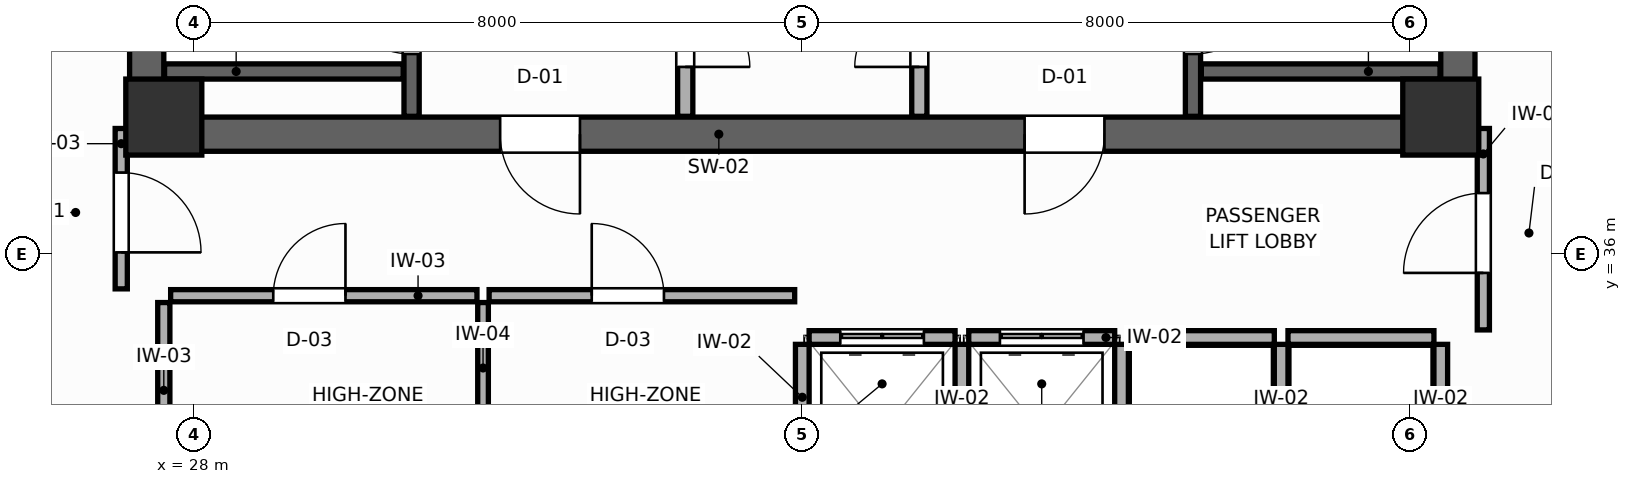
"""IFC4 building model, lengths in metres.
Left out: names, types, materials, properties, quantities, classifications, styles, units other than length and angle.
Written with IfcOpenShell. Run it as: python <this file> out.ifc"""

import sys

from ifc_helpers import new_model, si_unit, direction, frame, frame_2d, origin, origin_2d, place, context, subcontext, project, spatial, rectangle, extrude, source, transform, mapped, element, fill, save


model = new_model("IFC4")
c1 = context("Model", 3, precision=1e-05, world=origin(), true_north=direction((0.0, 1.0)))
c2 = subcontext(c1, "Body", "Model", "MODEL_VIEW")
j1 = project(units=[si_unit("LENGTHUNIT", "METRE"), si_unit("PLANEANGLEUNIT", "RADIAN")], contexts=[c1])
p1 = place(None, origin())
s1 = spatial("IfcSite", under=j1, at=p1, CompositionType="ELEMENT")
p2 = place(p1, origin())
s2 = spatial("IfcBuilding", under=s1, at=p2, CompositionType="ELEMENT")
p3 = place(p2, frame((0.0, 0.0, 186.6)))
s3 = spatial("IfcBuildingStorey", under=s2, at=p3, CompositionType="ELEMENT", Elevation=186.6)
p4 = place(p3, frame((27.15, 37.575, 0.0), z_axis=(0.0, 0.0, 1.0), x_axis=(1.0, 0.0, 0.0)))
e1 = element("IfcWall", 1, at=p4, inside=s3, PredefinedType="SHEAR", context=c2, shape_type="SweptSolid", body=[
    extrude(rectangle(XDim=17.7, YDim=0.45, at=frame_2d((8.85, 0.0))), origin(), (0.0, 0.0, 1.0), 3.6),
])
p5 = place(p4, frame((4.875, 0.0, 0.0)))
e2 = element("IfcOpeningElement", 2, at=p5, cuts=e1, PredefinedType="OPENING", context=c2, shape_type="SweptSolid", body=[
    extrude(rectangle(XDim=1.05, YDim=2.1, at=frame_2d((0.525, 1.05))), frame((0.0, 0.235, 0.0), z_axis=(0.0, -1.0, 0.0), x_axis=(1.0, 0.0, 0.0)), (0.0, 0.0, 1.0), 0.47),
])
p6 = place(p4, frame((11.775, 0.0, 0.0)))
e3 = element("IfcOpeningElement", 3, at=p6, cuts=e1, PredefinedType="OPENING", context=c2, shape_type="SweptSolid", body=[
    extrude(rectangle(XDim=1.05, YDim=2.1, at=frame_2d((0.525, 1.05))), frame((0.0, 0.235, 0.0), z_axis=(0.0, -1.0, 0.0), x_axis=(1.0, 0.0, 0.0)), (0.0, 0.0, 1.0), 0.47),
])
for number, where, z_axis, x_axis in (
    (4, (27.375, 37.8, 0.0), (0.0, 0.0, 1.0), (0.0, 1.0, 0.0)),
    (5, (44.625, 37.8, 0.0), (0.0, 0.0, 1.0), (0.0, 1.0, 0.0)),
):
    element("IfcWall", number, at=place(p3, frame(where, z_axis=z_axis, x_axis=x_axis)), inside=s3, PredefinedType="SHEAR", context=c2, shape_type="SweptSolid", body=[
        extrude(rectangle(XDim=9.0, YDim=0.45, at=frame_2d((4.5, 0.0))), origin(), (0.0, 0.0, 1.0), 3.6),
    ])
m1 = source(origin(), c2, "Body", "SweptSolid", [
    extrude(rectangle(XDim=1.0, YDim=1.0, at=origin_2d()), origin(), (0.0, 0.0, 1.0), 3.6),
])
for number, where, z_axis, x_axis in (
    (6, (27.6, 37.8, 0.0), (0.0, 0.0, 1.0), (1.0, 0.0, 0.0)),
    (7, (44.4, 37.8, 0.0), (0.0, 0.0, 1.0), (1.0, 0.0, 0.0)),
):
    element("IfcColumn", number, at=place(p3, frame(where, z_axis=z_axis, x_axis=x_axis)), inside=s3, PredefinedType="COLUMN", context=c2, shape_type="MappedRepresentation", body=[
        mapped(m1, transform((0.0, 0.0, 0.0), scale=1.0)),
    ])
p7 = place(p3, frame((30.86, 37.81, 0.0), z_axis=(0.0, 0.0, 1.0), x_axis=(0.0, 1.0, 0.0)))
e8 = element("IfcWall", 8, at=p7, inside=s3, PredefinedType="SHEAR", context=c2, shape_type="SweptSolid", body=[
    extrude(rectangle(XDim=8.98, YDim=0.2, at=frame_2d((4.49, 0.0))), origin(), (0.0, 0.0, 1.0), 3.6),
])
p8 = place(p7, frame((0.82, 0.0, 0.0)))
e9 = element("IfcOpeningElement", 9, at=p8, cuts=e8, PredefinedType="OPENING", context=c2, shape_type="SweptSolid", body=[
    extrude(rectangle(XDim=1.05, YDim=2.1, at=frame_2d((0.525, 1.05))), frame((0.0, 0.11, 0.0), z_axis=(0.0, -1.0, 0.0), x_axis=(1.0, 0.0, 0.0)), (0.0, 0.0, 1.0), 0.22),
])
p9 = place(p3, frame((27.61, 38.4, 0.0), z_axis=(0.0, 0.0, 1.0), x_axis=(1.0, 0.0, 0.0)))
e10 = element("IfcWall", 10, at=p9, inside=s3, PredefinedType="SHEAR", context=c2, shape_type="SweptSolid", body=[
    extrude(rectangle(XDim=3.14, YDim=0.2, at=frame_2d((1.57, 0.0))), origin(), (0.0, 0.0, 1.0), 3.6),
])
p10 = place(p3, frame((41.14, 37.81, 0.0), z_axis=(0.0, 0.0, 1.0), x_axis=(0.0, 1.0, 0.0)))
e11 = element("IfcWall", 11, at=p10, inside=s3, PredefinedType="SHEAR", context=c2, shape_type="SweptSolid", body=[
    extrude(rectangle(XDim=8.98, YDim=0.2, at=frame_2d((4.49, 0.0))), origin(), (0.0, 0.0, 1.0), 3.6),
])
p11 = place(p10, frame((0.82, 0.0, 0.0)))
e12 = element("IfcOpeningElement", 12, at=p11, cuts=e11, PredefinedType="OPENING", context=c2, shape_type="SweptSolid", body=[
    extrude(rectangle(XDim=1.05, YDim=2.1, at=frame_2d((0.525, 1.05))), frame((0.0, 0.11, 0.0), z_axis=(0.0, -1.0, 0.0), x_axis=(1.0, 0.0, 0.0)), (0.0, 0.0, 1.0), 0.22),
])
p12 = place(p3, frame((41.25, 38.4, 0.0), z_axis=(0.0, 0.0, 1.0), x_axis=(1.0, 0.0, 0.0)))
e13 = element("IfcWall", 13, at=p12, inside=s3, PredefinedType="SHEAR", context=c2, shape_type="SweptSolid", body=[
    extrude(rectangle(XDim=3.14, YDim=0.2, at=frame_2d((1.57, 0.0))), origin(), (0.0, 0.0, 1.0), 3.6),
])
p13 = place(p3, frame((34.46, 37.81, 0.0), z_axis=(0.0, 0.0, 1.0), x_axis=(0.0, 1.0, 0.0)))
e14 = element("IfcWall", 14, at=p13, inside=s3, PredefinedType="PARTITIONING", context=c2, shape_type="SweptSolid", body=[
    extrude(rectangle(XDim=8.98, YDim=0.2, at=frame_2d((4.49, 0.0))), origin(), (0.0, 0.0, 1.0), 3.4),
])
p14 = place(p13, frame((0.65, 0.0, 0.0)))
e15 = element("IfcOpeningElement", 15, at=p14, cuts=e14, PredefinedType="OPENING", context=c2, shape_type="SweptSolid", body=[
    extrude(rectangle(XDim=0.85, YDim=2.05, at=frame_2d((0.425, 1.025))), frame((0.0, 0.11, 0.0), z_axis=(0.0, -1.0, 0.0), x_axis=(1.0, 0.0, 0.0)), (0.0, 0.0, 1.0), 0.22),
])
p15 = place(p3, frame((37.54, 37.81, 0.0), z_axis=(0.0, 0.0, 1.0), x_axis=(0.0, 1.0, 0.0)))
e16 = element("IfcWall", 16, at=p15, inside=s3, PredefinedType="PARTITIONING", context=c2, shape_type="SweptSolid", body=[
    extrude(rectangle(XDim=8.98, YDim=0.2, at=frame_2d((4.49, 0.0))), origin(), (0.0, 0.0, 1.0), 3.4),
])
p16 = place(p15, frame((0.65, 0.0, 0.0)))
e17 = element("IfcOpeningElement", 17, at=p16, cuts=e16, PredefinedType="OPENING", context=c2, shape_type="SweptSolid", body=[
    extrude(rectangle(XDim=0.85, YDim=2.05, at=frame_2d((0.425, 1.025))), frame((0.0, 0.11, 0.0), z_axis=(0.0, -1.0, 0.0), x_axis=(1.0, 0.0, 0.0)), (0.0, 0.0, 1.0), 0.22),
])
p17 = place(p3, frame((36.09, 34.9, 0.0), z_axis=(0.0, 0.0, 1.0), x_axis=(1.0, 0.0, 0.0)))
e18 = element("IfcWall", 18, at=p17, inside=s3, PredefinedType="PARTITIONING", context=c2, shape_type="SweptSolid", body=[
    extrude(rectangle(XDim=1.92, YDim=0.18, at=frame_2d((0.96, 0.0))), origin(), (0.0, 0.0, 1.0), 3.4),
])
p18 = place(p17, frame((0.41, 0.0, 0.0)))
e19 = element("IfcOpeningElement", 19, at=p18, cuts=e18, PredefinedType="OPENING", context=c2, shape_type="SweptSolid", body=[
    extrude(rectangle(XDim=1.1, YDim=2.1, at=frame_2d((0.55, 1.05))), frame((0.0, 0.1, 0.0), z_axis=(0.0, -1.0, 0.0), x_axis=(1.0, 0.0, 0.0)), (0.0, 0.0, 1.0), 0.2),
])
p19 = place(p3, frame((36.0, 32.49, 0.0), z_axis=(0.0, 0.0, 1.0), x_axis=(0.0, 1.0, 0.0)))
e20 = element("IfcWall", 20, at=p19, inside=s3, PredefinedType="PARTITIONING", context=c2, shape_type="SweptSolid", body=[
    extrude(rectangle(XDim=2.32, YDim=0.18, at=frame_2d((1.16, 0.0))), origin(), (0.0, 0.0, 1.0), 3.4),
])
p20 = place(p3, frame((38.19, 34.9, 0.0), z_axis=(0.0, 0.0, 1.0), x_axis=(1.0, 0.0, 0.0)))
e21 = element("IfcWall", 21, at=p20, inside=s3, PredefinedType="PARTITIONING", context=c2, shape_type="SweptSolid", body=[
    extrude(rectangle(XDim=1.92, YDim=0.18, at=frame_2d((0.96, 0.0))), origin(), (0.0, 0.0, 1.0), 3.4),
])
p21 = place(p20, frame((0.41, 0.0, 0.0)))
e22 = element("IfcOpeningElement", 22, at=p21, cuts=e21, PredefinedType="OPENING", context=c2, shape_type="SweptSolid", body=[
    extrude(rectangle(XDim=1.1, YDim=2.1, at=frame_2d((0.55, 1.05))), frame((0.0, 0.1, 0.0), z_axis=(0.0, -1.0, 0.0), x_axis=(1.0, 0.0, 0.0)), (0.0, 0.0, 1.0), 0.2),
])
p22 = place(p3, frame((38.1, 32.49, 0.0), z_axis=(0.0, 0.0, 1.0), x_axis=(0.0, 1.0, 0.0)))
e23 = element("IfcWall", 23, at=p22, inside=s3, PredefinedType="PARTITIONING", context=c2, shape_type="SweptSolid", body=[
    extrude(rectangle(XDim=2.32, YDim=0.18, at=frame_2d((1.16, 0.0))), origin(), (0.0, 0.0, 1.0), 3.4),
])
p23 = place(p3, frame((40.29, 34.9, 0.0), z_axis=(0.0, 0.0, 1.0), x_axis=(1.0, 0.0, 0.0)))
e24 = element("IfcWall", 24, at=p23, inside=s3, PredefinedType="PARTITIONING", context=c2, shape_type="SweptSolid", body=[
    extrude(rectangle(XDim=1.92, YDim=0.18, at=frame_2d((0.96, 0.0))), origin(), (0.0, 0.0, 1.0), 3.4),
])
p24 = place(p3, frame((40.2, 32.49, 0.0), z_axis=(0.0, 0.0, 1.0), x_axis=(0.0, 1.0, 0.0)))
e25 = element("IfcWall", 25, at=p24, inside=s3, PredefinedType="PARTITIONING", context=c2, shape_type="SweptSolid", body=[
    extrude(rectangle(XDim=2.32, YDim=0.18, at=frame_2d((1.16, 0.0))), origin(), (0.0, 0.0, 1.0), 3.4),
])
p25 = place(p3, frame((42.39, 34.9, 0.0), z_axis=(0.0, 0.0, 1.0), x_axis=(1.0, 0.0, 0.0)))
e26 = element("IfcWall", 26, at=p25, inside=s3, PredefinedType="PARTITIONING", context=c2, shape_type="SweptSolid", body=[
    extrude(rectangle(XDim=1.92, YDim=0.18, at=frame_2d((0.96, 0.0))), origin(), (0.0, 0.0, 1.0), 3.4),
])
for number, where, z_axis, x_axis in (
    (27, (42.3, 32.49, 0.0), (0.0, 0.0, 1.0), (0.0, 1.0, 0.0)),
    (28, (44.4, 32.49, 0.0), (0.0, 0.0, 1.0), (0.0, 1.0, 0.0)),
):
    element("IfcWall", number, at=place(p3, frame(where, z_axis=z_axis, x_axis=x_axis)), inside=s3, PredefinedType="PARTITIONING", context=c2, shape_type="SweptSolid", body=[
        extrude(rectangle(XDim=2.32, YDim=0.18, at=frame_2d((1.16, 0.0))), origin(), (0.0, 0.0, 1.0), 3.4),
    ])
p26 = place(p3, frame((27.6, 33.05, 0.0), z_axis=(0.0, 0.0, 1.0), x_axis=(0.0, 1.0, 0.0)))
e29 = element("IfcWall", 29, at=p26, inside=s3, PredefinedType="PARTITIONING", context=c2, shape_type="SweptSolid", body=[
    extrude(rectangle(XDim=2.31, YDim=0.16, at=frame_2d((1.155, 0.0))), origin(), (0.0, 0.0, 1.0), 3.4),
])
p27 = place(p3, frame((31.8, 32.49, 0.0), z_axis=(0.0, 0.0, 1.0), x_axis=(0.0, 1.0, 0.0)))
e30 = element("IfcWall", 30, at=p27, inside=s3, PredefinedType="PARTITIONING", context=c2, shape_type="SweptSolid", body=[
    extrude(rectangle(XDim=2.87, YDim=0.14, at=frame_2d((1.435, 0.0))), origin(), (0.0, 0.0, 1.0), 3.4),
])
p28 = place(p3, frame((27.69, 35.45, 0.0), z_axis=(0.0, 0.0, 1.0), x_axis=(1.0, 0.0, 0.0)))
e31 = element("IfcWall", 31, at=p28, inside=s3, PredefinedType="PARTITIONING", context=c2, shape_type="SweptSolid", body=[
    extrude(rectangle(XDim=4.03, YDim=0.16, at=frame_2d((2.015, 0.0))), origin(), (0.0, 0.0, 1.0), 3.4),
])
p29 = place(p28, frame((1.35, 0.0, 0.0)))
e32 = element("IfcOpeningElement", 32, at=p29, cuts=e31, PredefinedType="OPENING", context=c2, shape_type="SweptSolid", body=[
    extrude(rectangle(XDim=0.95, YDim=2.05, at=frame_2d((0.475, 1.025))), frame((0.0, 0.09, 0.0), z_axis=(0.0, -1.0, 0.0), x_axis=(1.0, 0.0, 0.0)), (0.0, 0.0, 1.0), 0.18),
])
p30 = place(p3, frame((31.88, 35.45, 0.0), z_axis=(0.0, 0.0, 1.0), x_axis=(1.0, 0.0, 0.0)))
e33 = element("IfcWall", 33, at=p30, inside=s3, PredefinedType="PARTITIONING", context=c2, shape_type="SweptSolid", body=[
    extrude(rectangle(XDim=4.02, YDim=0.16, at=frame_2d((2.01, 0.0))), origin(), (0.0, 0.0, 1.0), 3.4),
])
p31 = place(p30, frame((1.35, 0.0, 0.0)))
e34 = element("IfcOpeningElement", 34, at=p31, cuts=e33, PredefinedType="OPENING", context=c2, shape_type="SweptSolid", body=[
    extrude(rectangle(XDim=0.95, YDim=2.05, at=frame_2d((0.475, 1.025))), frame((0.0, 0.09, 0.0), z_axis=(0.0, -1.0, 0.0), x_axis=(1.0, 0.0, 0.0)), (0.0, 0.0, 1.0), 0.18),
])
p32 = place(p3, frame((27.04, 35.54, 0.0), z_axis=(0.0, 0.0, 1.0), x_axis=(0.0, 1.0, 0.0)))
e35 = element("IfcWall", 35, at=p32, inside=s3, PredefinedType="PARTITIONING", context=c2, shape_type="SweptSolid", body=[
    extrude(rectangle(XDim=2.11, YDim=0.16, at=frame_2d((1.055, 0.0))), origin(), (0.0, 0.0, 1.0), 3.4),
])
p33 = place(p32, frame((0.48, 0.0, 0.0)))
e36 = element("IfcOpeningElement", 36, at=p33, cuts=e35, PredefinedType="OPENING", context=c2, shape_type="SweptSolid", body=[
    extrude(rectangle(XDim=1.05, YDim=2.1, at=frame_2d((0.525, 1.05))), frame((0.0, 0.09, 0.0), z_axis=(0.0, -1.0, 0.0), x_axis=(1.0, 0.0, 0.0)), (0.0, 0.0, 1.0), 0.18),
])
p34 = place(p3, frame((44.96, 35.0, 0.0), z_axis=(0.0, 0.0, 1.0), x_axis=(0.0, 1.0, 0.0)))
e37 = element("IfcWall", 37, at=p34, inside=s3, PredefinedType="PARTITIONING", context=c2, shape_type="SweptSolid", body=[
    extrude(rectangle(XDim=2.65, YDim=0.16, at=frame_2d((1.325, 0.0))), origin(), (0.0, 0.0, 1.0), 3.4),
])
p35 = place(p34, frame((0.75, 0.0, 0.0)))
e38 = element("IfcOpeningElement", 38, at=p35, cuts=e37, PredefinedType="OPENING", context=c2, shape_type="SweptSolid", body=[
    extrude(rectangle(XDim=1.05, YDim=2.1, at=frame_2d((0.525, 1.05))), frame((0.0, 0.09, 0.0), z_axis=(0.0, -1.0, 0.0), x_axis=(1.0, 0.0, 0.0)), (0.0, 0.0, 1.0), 0.18),
])
p36 = place(p8, origin())
e39 = element("IfcDoor", 39, at=p36, inside=s3, OperationType="SINGLE_SWING_RIGHT", PredefinedType="DOOR", context=c2, shape_type="SweptSolid", body=[
    extrude(rectangle(XDim=1.05, YDim=2.1, at=frame_2d((0.525, 1.05))), frame((0.0, 0.025, 0.0), z_axis=(0.0, -1.0, 0.0), x_axis=(1.0, 0.0, 0.0)), (0.0, 0.0, 1.0), 0.05),
])
fill(e9, e39)
p37 = place(p11, frame((1.05, 0.0, 0.0), z_axis=(0.0, 0.0, 1.0), x_axis=(-1.0, 0.0, 0.0)))
e40 = element("IfcDoor", 40, at=p37, inside=s3, OperationType="SINGLE_SWING_LEFT", PredefinedType="DOOR", context=c2, shape_type="SweptSolid", body=[
    extrude(rectangle(XDim=1.05, YDim=2.1, at=frame_2d((0.525, 1.05))), frame((0.0, 0.025, 0.0), z_axis=(0.0, -1.0, 0.0), x_axis=(1.0, 0.0, 0.0)), (0.0, 0.0, 1.0), 0.05),
])
fill(e12, e40)
p38 = place(p14, frame((0.85, 0.0, 0.0), z_axis=(0.0, 0.0, 1.0), x_axis=(-1.0, 0.0, 0.0)))
e41 = element("IfcDoor", 41, at=p38, inside=s3, OperationType="SINGLE_SWING_RIGHT", PredefinedType="DOOR", context=c2, shape_type="SweptSolid", body=[
    extrude(rectangle(XDim=0.85, YDim=2.05, at=frame_2d((0.425, 1.025))), frame((0.0, 0.025, 0.0), z_axis=(0.0, -1.0, 0.0), x_axis=(1.0, 0.0, 0.0)), (0.0, 0.0, 1.0), 0.05),
])
fill(e15, e41)
p39 = place(p16, origin())
e42 = element("IfcDoor", 42, at=p39, inside=s3, OperationType="SINGLE_SWING_LEFT", PredefinedType="DOOR", context=c2, shape_type="SweptSolid", body=[
    extrude(rectangle(XDim=0.85, YDim=2.05, at=frame_2d((0.425, 1.025))), frame((0.0, 0.025, 0.0), z_axis=(0.0, -1.0, 0.0), x_axis=(1.0, 0.0, 0.0)), (0.0, 0.0, 1.0), 0.05),
])
fill(e17, e42)
p40 = place(p18, origin())
e43 = element("IfcDoor", 43, at=p40, inside=s3, OperationType="DOUBLE_DOOR_SLIDING", PredefinedType="DOOR", context=c2, shape_type="SweptSolid", body=[
    extrude(rectangle(XDim=1.1, YDim=2.1, at=frame_2d((0.55, 1.05))), frame((0.0, 0.025, 0.0), z_axis=(0.0, -1.0, 0.0), x_axis=(1.0, 0.0, 0.0)), (0.0, 0.0, 1.0), 0.05),
])
fill(e19, e43)
p41 = place(p21, origin())
e44 = element("IfcDoor", 44, at=p41, inside=s3, OperationType="DOUBLE_DOOR_SLIDING", PredefinedType="DOOR", context=c2, shape_type="SweptSolid", body=[
    extrude(rectangle(XDim=1.1, YDim=2.1, at=frame_2d((0.55, 1.05))), frame((0.0, 0.025, 0.0), z_axis=(0.0, -1.0, 0.0), x_axis=(1.0, 0.0, 0.0)), (0.0, 0.0, 1.0), 0.05),
])
fill(e22, e44)
p42 = place(p29, origin())
e45 = element("IfcDoor", 45, at=p42, inside=s3, OperationType="SINGLE_SWING_RIGHT", PredefinedType="DOOR", context=c2, shape_type="SweptSolid", body=[
    extrude(rectangle(XDim=0.95, YDim=2.05, at=frame_2d((0.475, 1.025))), frame((0.0, 0.025, 0.0), z_axis=(0.0, -1.0, 0.0), x_axis=(1.0, 0.0, 0.0)), (0.0, 0.0, 1.0), 0.05),
])
fill(e32, e45)
p43 = place(p31, origin())
e46 = element("IfcDoor", 46, at=p43, inside=s3, OperationType="SINGLE_SWING_LEFT", PredefinedType="DOOR", context=c2, shape_type="SweptSolid", body=[
    extrude(rectangle(XDim=0.95, YDim=2.05, at=frame_2d((0.475, 1.025))), frame((0.0, 0.025, 0.0), z_axis=(0.0, -1.0, 0.0), x_axis=(1.0, 0.0, 0.0)), (0.0, 0.0, 1.0), 0.05),
])
fill(e34, e46)
p44 = place(p33, frame((1.05, 0.0, 0.0), z_axis=(0.0, 0.0, 1.0), x_axis=(-1.0, 0.0, 0.0)))
e47 = element("IfcDoor", 47, at=p44, inside=s3, OperationType="SINGLE_SWING_RIGHT", PredefinedType="DOOR", context=c2, shape_type="SweptSolid", body=[
    extrude(rectangle(XDim=1.05, YDim=2.1, at=frame_2d((0.525, 1.05))), frame((0.0, 0.025, 0.0), z_axis=(0.0, -1.0, 0.0), x_axis=(1.0, 0.0, 0.0)), (0.0, 0.0, 1.0), 0.05),
])
fill(e36, e47)
p45 = place(p35, origin())
e48 = element("IfcDoor", 48, at=p45, inside=s3, OperationType="SINGLE_SWING_LEFT", PredefinedType="DOOR", context=c2, shape_type="SweptSolid", body=[
    extrude(rectangle(XDim=1.05, YDim=2.1, at=frame_2d((0.525, 1.05))), frame((0.0, 0.025, 0.0), z_axis=(0.0, -1.0, 0.0), x_axis=(1.0, 0.0, 0.0)), (0.0, 0.0, 1.0), 0.05),
])
fill(e38, e48)
p46 = place(p5, frame((1.05, 0.0, 0.0), z_axis=(0.0, 0.0, 1.0), x_axis=(-1.0, 0.0, 0.0)))
e49 = element("IfcDoor", 49, at=p46, inside=s3, OperationType="SINGLE_SWING_LEFT", PredefinedType="DOOR", context=c2, shape_type="SweptSolid", body=[
    extrude(rectangle(XDim=1.05, YDim=2.1, at=frame_2d((0.525, 1.05))), frame((0.0, 0.025, 0.0), z_axis=(0.0, -1.0, 0.0), x_axis=(1.0, 0.0, 0.0)), (0.0, 0.0, 1.0), 0.05),
])
fill(e2, e49)
p47 = place(p6, frame((1.05, 0.0, 0.0), z_axis=(0.0, 0.0, 1.0), x_axis=(-1.0, 0.0, 0.0)))
e50 = element("IfcDoor", 50, at=p47, inside=s3, OperationType="SINGLE_SWING_RIGHT", PredefinedType="DOOR", context=c2, shape_type="SweptSolid", body=[
    extrude(rectangle(XDim=1.05, YDim=2.1, at=frame_2d((0.525, 1.05))), frame((0.0, 0.025, 0.0), z_axis=(0.0, -1.0, 0.0), x_axis=(1.0, 0.0, 0.0)), (0.0, 0.0, 1.0), 0.05),
])
fill(e3, e50)
save(model, sys.argv[1])
